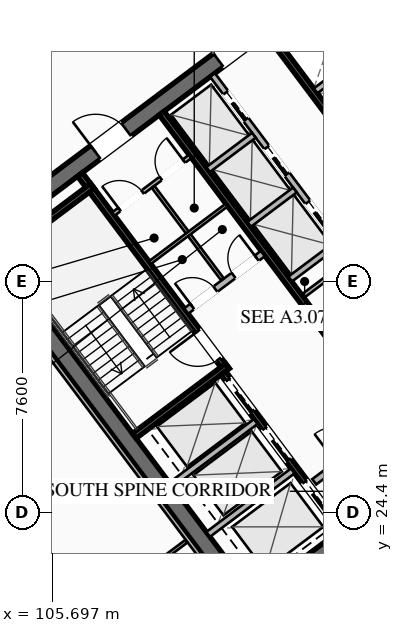
"""IFC4 building model, lengths in metres.
Left out: names, types, materials, properties, quantities, classifications, styles, units other than length and angle.
Written with IfcOpenShell. Run it as: python <this file> out.ifc"""

import sys

from ifc_helpers import new_model, si_unit, direction, frame, frame_2d, origin, place, context, subcontext, project, spatial, rectangle, extrude, element, fill, save


model = new_model("IFC4")
c1 = context("Model", 3, precision=1e-05, world=origin(), true_north=direction((0.0, 1.0)))
c2 = subcontext(c1, "Body", "Model", "MODEL_VIEW")
j1 = project(units=[si_unit("LENGTHUNIT", "METRE"), si_unit("PLANEANGLEUNIT", "RADIAN")], contexts=[c1])
p1 = place(None, origin())
s1 = spatial("IfcSite", under=j1, at=p1, CompositionType="ELEMENT")
p2 = place(p1, origin())
s2 = spatial("IfcBuilding", under=s1, at=p2, CompositionType="ELEMENT")
p3 = place(p2, frame((0.0, 0.0, 174.75)))
s3 = spatial("IfcBuildingStorey", under=s2, at=p3, CompositionType="ELEMENT", Elevation=174.75)
p4 = place(p3, frame((112.436, 21.077, 0.0), z_axis=(0.0, 0.0, 1.0), x_axis=(-0.600005007985, 0.799996243986, 0.0)))
e1 = element("IfcWall", 1, at=p4, inside=s3, PredefinedType="SHEAR", context=c2, shape_type="SweptSolid", body=[
    extrude(rectangle(XDim=15.6, YDim=0.55, at=frame_2d((7.8, 0.0))), origin(), (0.0, 0.0, 1.0), 3.55),
])
p5 = place(p3, frame((124.539, 30.498, 0.0), z_axis=(0.0, 0.0, 1.0), x_axis=(-0.799998054672, -0.600002593761, 0.0)))
e2 = element("IfcWall", 2, at=p5, inside=s3, PredefinedType="SHEAR", context=c2, shape_type="SweptSolid", body=[
    extrude(rectangle(XDim=15.06, YDim=0.55, at=frame_2d((7.53, 0.0))), origin(), (0.0, 0.0, 1.0), 3.55),
])
p6 = place(p5, frame((9.23, 0.0, 0.0)))
e3 = element("IfcOpeningElement", 3, at=p6, cuts=e2, PredefinedType="OPENING", context=c2, shape_type="SweptSolid", body=[
    extrude(rectangle(XDim=1.25, YDim=2.25, at=frame_2d((0.625, 1.125))), frame((0.0, 0.285, 0.0), z_axis=(0.0, -1.0, 0.0), x_axis=(1.0, 0.0, 0.0)), (0.0, 0.0, 1.0), 0.57),
])
p7 = place(p5, frame((4.18, 0.0, 0.0)))
e4 = element("IfcOpeningElement", 4, at=p7, cuts=e2, PredefinedType="OPENING", context=c2, shape_type="SweptSolid", body=[
    extrude(rectangle(XDim=1.25, YDim=2.25, at=frame_2d((0.625, 1.125))), frame((0.0, 0.285, 0.0), z_axis=(0.0, -1.0, 0.0), x_axis=(1.0, 0.0, 0.0)), (0.0, 0.0, 1.0), 0.57),
])
p8 = place(p3, frame((103.461, 33.502, 0.0), z_axis=(0.0, 0.0, 1.0), x_axis=(0.799998054672, 0.600002593761, 0.0)))
e5 = element("IfcWall", 5, at=p8, inside=s3, PredefinedType="SHEAR", context=c2, shape_type="SweptSolid", body=[
    extrude(rectangle(XDim=15.06, YDim=0.55, at=frame_2d((7.53, 0.0))), origin(), (0.0, 0.0, 1.0), 3.55),
])
p9 = place(p8, frame((4.58, 0.0, 0.0)))
e6 = element("IfcOpeningElement", 6, at=p9, cuts=e5, PredefinedType="OPENING", context=c2, shape_type="SweptSolid", body=[
    extrude(rectangle(XDim=1.25, YDim=2.25, at=frame_2d((0.625, 1.125))), frame((0.0, 0.285, 0.0), z_axis=(0.0, -1.0, 0.0), x_axis=(1.0, 0.0, 0.0)), (0.0, 0.0, 1.0), 0.57),
])
p10 = place(p8, frame((9.63, 0.0, 0.0)))
e7 = element("IfcOpeningElement", 7, at=p10, cuts=e5, PredefinedType="OPENING", context=c2, shape_type="SweptSolid", body=[
    extrude(rectangle(XDim=1.25, YDim=2.25, at=frame_2d((0.625, 1.125))), frame((0.0, 0.285, 0.0), z_axis=(0.0, -1.0, 0.0), x_axis=(1.0, 0.0, 0.0)), (0.0, 0.0, 1.0), 0.57),
])
p11 = place(p3, frame((111.44, 29.08, 0.0), z_axis=(0.0, 0.0, 1.0), x_axis=(-0.59999029481, 0.8000072788, 0.0)))
e8 = element("IfcWall", 8, at=p11, inside=s3, PredefinedType="SHEAR", context=c2, shape_type="SweptSolid", body=[
    extrude(rectangle(XDim=8.05, YDim=0.2, at=frame_2d((4.025, 0.0))), origin(), (0.0, 0.0, 1.0), 3.37),
])
p12 = place(p11, frame((0.45, 0.0, 0.0)))
e9 = element("IfcOpeningElement", 9, at=p12, cuts=e8, PredefinedType="OPENING", context=c2, shape_type="SweptSolid", body=[
    extrude(rectangle(XDim=1.15, YDim=2.2, at=frame_2d((0.575, 1.1))), frame((0.0, 0.11, 0.0), z_axis=(0.0, -1.0, 0.0), x_axis=(1.0, 0.0, 0.0)), (0.0, 0.0, 1.0), 0.22),
])
for number, where, z_axis, x_axis in (
    (10, (108.396, 26.922, 0.0), (0.0, 0.0, 1.0), (0.8, 0.6, 0.0)),
    (11, (103.956, 32.842, 0.0), (0.0, 0.0, 1.0), (0.8, 0.6, 0.0)),
):
    element("IfcWall", number, at=place(p3, frame(where, z_axis=z_axis, x_axis=x_axis)), inside=s3, PredefinedType="SHEAR", context=c2, shape_type="SweptSolid", body=[
        extrude(rectangle(XDim=3.83, YDim=0.2, at=frame_2d((1.915, 0.0))), origin(), (0.0, 0.0, 1.0), 3.37),
    ])
p13 = place(p3, frame((117.998, 25.936, 0.0), z_axis=(0.0, 0.0, 1.0), x_axis=(-0.600002693989, 0.799997979501, 0.0)))
e12 = element("IfcWall", 12, at=p13, inside=s3, PredefinedType="SHEAR", context=c2, shape_type="SweptSolid", body=[
    extrude(rectangle(XDim=14.5, YDim=0.2, at=frame_2d((7.25, 0.0))), origin(), (0.0, 0.0, 1.0), 3.37),
])
p14 = place(p3, frame((110.104, 31.028, 0.0), z_axis=(0.0, 0.0, 1.0), x_axis=(0.800018601094, 0.59997519774, 0.0)))
e13 = element("IfcWall", 13, at=p14, inside=s3, PredefinedType="SOLIDWALL", context=c2, shape_type="SweptSolid", body=[
    extrude(rectangle(XDim=3.15, YDim=0.22, at=frame_2d((1.575, 0.0))), origin(), (0.0, 0.0, 1.0), 2.723),
])
p15 = place(p14, frame((0.25, 0.0, 0.0)))
e14 = element("IfcOpeningElement", 14, at=p15, cuts=e13, PredefinedType="OPENING", context=c2, shape_type="SweptSolid", body=[
    extrude(rectangle(XDim=0.95, YDim=2.05, at=frame_2d((0.475, 1.025))), frame((0.0, 0.12, 0.0), z_axis=(0.0, -1.0, 0.0), x_axis=(1.0, 0.0, 0.0)), (0.0, 0.0, 1.0), 0.24),
])
p16 = place(p14, frame((1.95, 0.0, 0.0)))
e15 = element("IfcOpeningElement", 15, at=p16, cuts=e13, PredefinedType="OPENING", context=c2, shape_type="SweptSolid", body=[
    extrude(rectangle(XDim=0.95, YDim=2.05, at=frame_2d((0.475, 1.025))), frame((0.0, 0.12, 0.0), z_axis=(0.0, -1.0, 0.0), x_axis=(1.0, 0.0, 0.0)), (0.0, 0.0, 1.0), 0.24),
])
p17 = place(p3, frame((114.316, 25.412, 0.0), z_axis=(0.0, 0.0, 1.0), x_axis=(0.800018601094, 0.59997519774, 0.0)))
e16 = element("IfcWall", 16, at=p17, inside=s3, PredefinedType="SOLIDWALL", context=c2, shape_type="SweptSolid", body=[
    extrude(rectangle(XDim=3.15, YDim=0.22, at=frame_2d((1.575, 0.0))), origin(), (0.0, 0.0, 1.0), 2.723),
])
p18 = place(p17, frame((0.95, 0.0, 0.0)))
e17 = element("IfcOpeningElement", 17, at=p18, cuts=e16, PredefinedType="OPENING", context=c2, shape_type="SweptSolid", body=[
    extrude(rectangle(XDim=1.25, YDim=2.25, at=frame_2d((0.625, 1.125))), frame((0.0, 0.12, 0.0), z_axis=(0.0, -1.0, 0.0), x_axis=(1.0, 0.0, 0.0)), (0.0, 0.0, 1.0), 0.24),
])
p19 = place(p3, frame((115.19, 23.83, 0.0), z_axis=(0.0, 0.0, 1.0), x_axis=(-0.599993943644, 0.800004542231, 0.0)))
e18 = element("IfcWall", 18, at=p19, inside=s3, PredefinedType="SHEAR", context=c2, shape_type="SweptSolid", body=[
    extrude(rectangle(XDim=6.45, YDim=0.2, at=frame_2d((3.225, 0.0))), origin(), (0.0, 0.0, 1.0), 3.37),
])
p20 = place(p19, frame((4.875, 0.0, 0.0)))
e19 = element("IfcOpeningElement", 19, at=p20, cuts=e18, PredefinedType="OPENING", context=c2, shape_type="SweptSolid", body=[
    extrude(rectangle(XDim=1.3, YDim=2.25, at=frame_2d((0.65, 1.125))), frame((0.0, 0.11, 0.0), z_axis=(0.0, -1.0, 0.0), x_axis=(1.0, 0.0, 0.0)), (0.0, 0.0, 1.0), 0.22),
])
p21 = place(p19, frame((2.875, 0.0, 0.0)))
e20 = element("IfcOpeningElement", 20, at=p21, cuts=e18, PredefinedType="OPENING", context=c2, shape_type="SweptSolid", body=[
    extrude(rectangle(XDim=1.3, YDim=2.25, at=frame_2d((0.65, 1.125))), frame((0.0, 0.11, 0.0), z_axis=(0.0, -1.0, 0.0), x_axis=(1.0, 0.0, 0.0)), (0.0, 0.0, 1.0), 0.22),
])
p22 = place(p19, frame((0.675, 0.0, 0.0)))
e21 = element("IfcOpeningElement", 21, at=p22, cuts=e18, PredefinedType="OPENING", context=c2, shape_type="SweptSolid", body=[
    extrude(rectangle(XDim=1.3, YDim=2.25, at=frame_2d((0.65, 1.125))), frame((0.0, 0.11, 0.0), z_axis=(0.0, -1.0, 0.0), x_axis=(1.0, 0.0, 0.0)), (0.0, 0.0, 1.0), 0.22),
])
for number, where, z_axis, x_axis in (
    (22, (110.826, 23.682, 0.0), (0.0, 0.0, 1.0), (0.8, 0.6, 0.0)),
    (23, (109.608, 25.306, 0.0), (0.0, 0.0, 1.0), (0.8, 0.6, 0.0)),
):
    element("IfcWall", number, at=place(p3, frame(where, z_axis=z_axis, x_axis=x_axis)), inside=s3, PredefinedType="SOLIDWALL", context=c2, shape_type="SweptSolid", body=[
        extrude(rectangle(XDim=3.48, YDim=0.2, at=frame_2d((1.74, 0.0))), origin(), (0.0, 0.0, 1.0), 3.37),
    ])
p23 = place(p3, frame((112.81, 40.17, 0.0), z_axis=(0.0, 0.0, 1.0), x_axis=(0.599993943644, -0.800004542231, 0.0)))
e24 = element("IfcWall", 24, at=p23, inside=s3, PredefinedType="SHEAR", context=c2, shape_type="SweptSolid", body=[
    extrude(rectangle(XDim=6.45, YDim=0.2, at=frame_2d((3.225, 0.0))), origin(), (0.0, 0.0, 1.0), 3.37),
])
p24 = place(p3, frame((114.36, 38.27, 0.0), z_axis=(0.0, 0.0, 1.0), x_axis=(0.800008418847, 0.599988774707, 0.0)))
e25 = element("IfcWall", 25, at=p24, inside=s3, PredefinedType="SOLIDWALL", context=c2, shape_type="SweptSolid", body=[
    extrude(rectangle(XDim=3.48, YDim=0.2, at=frame_2d((1.74, 0.0))), origin(), (0.0, 0.0, 1.0), 3.37),
])
p25 = place(p3, frame((107.71, 34.22, 0.0), z_axis=(0.0, 0.0, 1.0), x_axis=(0.799981399002, 0.60002480053, 0.0)))
e26 = element("IfcWall", 26, at=p25, inside=s3, PredefinedType="PARTITIONING", context=c2, shape_type="SweptSolid", body=[
    extrude(rectangle(XDim=3.15, YDim=0.135, at=frame_2d((1.575, 0.0))), origin(), (0.0, 0.0, 1.0), 2.723),
])
p26 = place(p25, frame((0.25, 0.0, 0.0)))
e27 = element("IfcOpeningElement", 27, at=p26, cuts=e26, PredefinedType="OPENING", context=c2, shape_type="SweptSolid", body=[
    extrude(rectangle(XDim=0.95, YDim=2.05, at=frame_2d((0.475, 1.025))), frame((0.0, 0.077, 0.0), z_axis=(0.0, -1.0, 0.0), x_axis=(1.0, 0.0, 0.0)), (0.0, 0.0, 1.0), 0.155),
])
p27 = place(p25, frame((1.95, 0.0, 0.0)))
e28 = element("IfcOpeningElement", 28, at=p27, cuts=e26, PredefinedType="OPENING", context=c2, shape_type="SweptSolid", body=[
    extrude(rectangle(XDim=0.95, YDim=2.05, at=frame_2d((0.475, 1.025))), frame((0.0, 0.077, 0.0), z_axis=(0.0, -1.0, 0.0), x_axis=(1.0, 0.0, 0.0)), (0.0, 0.0, 1.0), 0.155),
])
p28 = place(p3, frame((111.296, 32.072, 0.0), z_axis=(0.0, 0.0, 1.0), x_axis=(-0.59995887973, 0.800030838552, 0.0)))
e29 = element("IfcWall", 29, at=p28, inside=s3, PredefinedType="PARTITIONING", context=c2, shape_type="SweptSolid", body=[
    extrude(rectangle(XDim=3.8, YDim=0.11, at=frame_2d((1.9, 0.0))), origin(), (0.0, 0.0, 1.0), 2.723),
])
p29 = place(p3, frame((108.91, 32.62, 0.0), z_axis=(0.0, 0.0, 1.0), x_axis=(0.800018601094, 0.59997519774, 0.0)))
e30 = element("IfcWall", 30, at=p29, inside=s3, PredefinedType="PARTITIONING", context=c2, shape_type="SweptSolid", body=[
    extrude(rectangle(XDim=3.15, YDim=0.11, at=frame_2d((1.575, 0.0))), origin(), (0.0, 0.0, 1.0), 2.723),
])
p30 = place(p3, frame((113.946, 31.522, 0.0), z_axis=(0.0, 0.0, 1.0), x_axis=(0.8, 0.6, 0.0)))
e31 = element("IfcWall", 31, at=p30, inside=s3, PredefinedType="PARTITIONING", context=c2, shape_type="SweptSolid", body=[
    extrude(rectangle(XDim=1.88, YDim=0.135, at=frame_2d((0.94, 0.0))), origin(), (0.0, 0.0, 1.0), 2.723),
])
p31 = place(p3, frame((115.11, 33.27, 0.0), z_axis=(0.0, 0.0, 1.0), x_axis=(-0.600011322243, 0.799991508192, 0.0)))
e32 = element("IfcWall", 32, at=p31, inside=s3, PredefinedType="SOLIDWALL", context=c2, shape_type="SweptSolid", body=[
    extrude(rectangle(XDim=6.9, YDim=0.2, at=frame_2d((3.45, 0.0))), origin(), (0.0, 0.0, 1.0), 3.37),
])
p32 = place(p31, frame((0.575, 0.0, 0.0)))
e33 = element("IfcOpeningElement", 33, at=p32, cuts=e32, PredefinedType="OPENING", context=c2, shape_type="SweptSolid", body=[
    extrude(rectangle(XDim=1.1, YDim=2.2, at=frame_2d((0.55, 1.1))), frame((0.0, 0.11, 0.0), z_axis=(0.0, -1.0, 0.0), x_axis=(1.0, 0.0, 0.0)), (0.0, 0.0, 1.0), 0.22),
])
p33 = place(p31, frame((2.825, 0.0, 0.0)))
e34 = element("IfcOpeningElement", 34, at=p33, cuts=e32, PredefinedType="OPENING", context=c2, shape_type="SweptSolid", body=[
    extrude(rectangle(XDim=1.1, YDim=2.2, at=frame_2d((0.55, 1.1))), frame((0.0, 0.11, 0.0), z_axis=(0.0, -1.0, 0.0), x_axis=(1.0, 0.0, 0.0)), (0.0, 0.0, 1.0), 0.22),
])
p34 = place(p31, frame((5.075, 0.0, 0.0)))
e35 = element("IfcOpeningElement", 35, at=p34, cuts=e32, PredefinedType="OPENING", context=c2, shape_type="SweptSolid", body=[
    extrude(rectangle(XDim=1.1, YDim=2.2, at=frame_2d((0.55, 1.1))), frame((0.0, 0.11, 0.0), z_axis=(0.0, -1.0, 0.0), x_axis=(1.0, 0.0, 0.0)), (0.0, 0.0, 1.0), 0.22),
])
p35 = place(p3, frame((113.526, 32.082, 0.0), z_axis=(0.0, 0.0, 1.0), x_axis=(0.800046745961, 0.599937666993, 0.0)))
e36 = element("IfcWall", 36, at=p35, inside=s3, PredefinedType="SOLIDWALL", context=c2, shape_type="SweptSolid", body=[
    extrude(rectangle(XDim=1.88, YDim=0.2, at=frame_2d((0.94, 0.0))), origin(), (0.0, 0.0, 1.0), 3.37),
])
p36 = place(p3, frame((112.176, 33.882, 0.0), z_axis=(0.0, 0.0, 1.0), x_axis=(0.8, 0.6, 0.0)))
e37 = element("IfcWall", 37, at=p36, inside=s3, PredefinedType="SOLIDWALL", context=c2, shape_type="SweptSolid", body=[
    extrude(rectangle(XDim=1.88, YDim=0.2, at=frame_2d((0.94, 0.0))), origin(), (0.0, 0.0, 1.0), 3.37),
])
p37 = place(p3, frame((110.826, 35.682, 0.0), z_axis=(0.0, 0.0, 1.0), x_axis=(0.799984418148, 0.600020775241, 0.0)))
e38 = element("IfcWall", 38, at=p37, inside=s3, PredefinedType="SOLIDWALL", context=c2, shape_type="SweptSolid", body=[
    extrude(rectangle(XDim=1.88, YDim=0.2, at=frame_2d((0.94, 0.0))), origin(), (0.0, 0.0, 1.0), 3.37),
])
p38 = place(p3, frame((95.548, 32.686, 0.0), z_axis=(0.0, 0.0, 1.0), x_axis=(0.8, 0.6, 0.0)))
e39 = element("IfcWall", 39, at=p38, inside=s3, PredefinedType="PARTITIONING", context=c2, shape_type="SweptSolid", body=[
    extrude(rectangle(XDim=28.7, YDim=0.135, at=frame_2d((14.35, 0.0))), origin(), (0.0, 0.0, 1.0), 2.723),
])
p39 = place(p38, frame((0.3, 0.0, 0.0)))
e40 = element("IfcOpeningElement", 40, at=p39, cuts=e39, PredefinedType="OPENING", context=c2, shape_type="SweptSolid", body=[
    extrude(rectangle(XDim=0.95, YDim=2.05, at=frame_2d((0.475, 1.025))), frame((0.0, 0.077, 0.0), z_axis=(0.0, -1.0, 0.0), x_axis=(1.0, 0.0, 0.0)), (0.0, 0.0, 1.0), 0.155),
])
p40 = place(p38, frame((27.45, 0.0, 0.0)))
e41 = element("IfcOpeningElement", 41, at=p40, cuts=e39, PredefinedType="OPENING", context=c2, shape_type="SweptSolid", body=[
    extrude(rectangle(XDim=0.95, YDim=2.05, at=frame_2d((0.475, 1.025))), frame((0.0, 0.077, 0.0), z_axis=(0.0, -1.0, 0.0), x_axis=(1.0, 0.0, 0.0)), (0.0, 0.0, 1.0), 0.155),
])
p41 = place(p3, frame((131.15, 33.05, 0.0), z_axis=(0.0, 0.0, 1.0), x_axis=(-0.8, -0.6, 0.0)))
e42 = element("IfcWall", 42, at=p41, inside=s3, PredefinedType="PARTITIONING", context=c2, shape_type="SweptSolid", body=[
    extrude(rectangle(XDim=28.7, YDim=0.135, at=frame_2d((14.35, 0.0))), origin(), (0.0, 0.0, 1.0), 2.723),
])
p42 = place(p41, frame((27.37, 0.0, 0.0)))
e43 = element("IfcOpeningElement", 43, at=p42, cuts=e42, PredefinedType="OPENING", context=c2, shape_type="SweptSolid", body=[
    extrude(rectangle(XDim=0.95, YDim=2.05, at=frame_2d((0.475, 1.025))), frame((0.0, 0.077, 0.0), z_axis=(0.0, -1.0, 0.0), x_axis=(1.0, 0.0, 0.0)), (0.0, 0.0, 1.0), 0.155),
])
p43 = place(p41, frame((17.851, 0.0, 0.0)))
e44 = element("IfcOpeningElement", 44, at=p43, cuts=e42, PredefinedType="OPENING", context=c2, shape_type="SweptSolid", body=[
    extrude(rectangle(XDim=0.95, YDim=2.05, at=frame_2d((0.475, 1.025))), frame((0.0, 0.077, 0.0), z_axis=(0.0, -1.0, 0.0), x_axis=(1.0, 0.0, 0.0)), (0.0, 0.0, 1.0), 0.155),
])
p44 = place(p41, frame((13.601, 0.0, 0.0)))
e45 = element("IfcOpeningElement", 45, at=p44, cuts=e42, PredefinedType="OPENING", context=c2, shape_type="SweptSolid", body=[
    extrude(rectangle(XDim=0.95, YDim=2.05, at=frame_2d((0.475, 1.025))), frame((0.0, 0.077, 0.0), z_axis=(0.0, -1.0, 0.0), x_axis=(1.0, 0.0, 0.0)), (0.0, 0.0, 1.0), 0.155),
])
p45 = place(p41, frame((9.62, 0.0, 0.0)))
e46 = element("IfcOpeningElement", 46, at=p45, cuts=e42, PredefinedType="OPENING", context=c2, shape_type="SweptSolid", body=[
    extrude(rectangle(XDim=0.95, YDim=2.05, at=frame_2d((0.475, 1.025))), frame((0.0, 0.077, 0.0), z_axis=(0.0, -1.0, 0.0), x_axis=(1.0, 0.0, 0.0)), (0.0, 0.0, 1.0), 0.155),
])
p46 = place(p41, frame((0.38, 0.0, 0.0)))
e47 = element("IfcOpeningElement", 47, at=p46, cuts=e42, PredefinedType="OPENING", context=c2, shape_type="SweptSolid", body=[
    extrude(rectangle(XDim=0.95, YDim=2.05, at=frame_2d((0.475, 1.025))), frame((0.0, 0.077, 0.0), z_axis=(0.0, -1.0, 0.0), x_axis=(1.0, 0.0, 0.0)), (0.0, 0.0, 1.0), 0.155),
])
p47 = place(p3, frame((112.104, 20.928, 0.0), z_axis=(0.0, 0.0, 1.0), x_axis=(-0.599994940075, 0.800003794918, 0.0)))
e48 = element("IfcWall", 48, at=p47, inside=s3, PredefinedType="PARTITIONING", context=c2, shape_type="SweptSolid", body=[
    extrude(rectangle(XDim=15.44, YDim=0.135, at=frame_2d((7.72, 0.0))), origin(), (0.0, 0.0, 1.0), 2.723),
])
p48 = place(p3, frame((103.396, 18.422, 0.0), z_axis=(0.0, 0.0, 1.0), x_axis=(0.8, 0.6, 0.0)))
e49 = element("IfcWall", 49, at=p48, inside=s3, PredefinedType="PARTITIONING", context=c2, shape_type="SweptSolid", body=[
    extrude(rectangle(XDim=8.39, YDim=0.11, at=frame_2d((4.195, 0.0))), origin(), (0.0, 0.0, 1.0), 2.723),
])
p49 = place(p9, origin())
e50 = element("IfcDoor", 50, at=p49, inside=s3, OperationType="SINGLE_SWING_LEFT", PredefinedType="DOOR", context=c2, shape_type="SweptSolid", body=[
    extrude(rectangle(XDim=1.25, YDim=2.25, at=frame_2d((0.625, 1.125))), frame((0.0, 0.025, 0.0), z_axis=(0.0, -1.0, 0.0), x_axis=(1.0, 0.0, 0.0)), (0.0, 0.0, 1.0), 0.05),
])
fill(e6, e50)
p50 = place(p10, origin())
e51 = element("IfcDoor", 51, at=p50, inside=s3, OperationType="SINGLE_SWING_RIGHT", PredefinedType="DOOR", context=c2, shape_type="SweptSolid", body=[
    extrude(rectangle(XDim=1.25, YDim=2.25, at=frame_2d((0.625, 1.125))), frame((0.0, 0.025, 0.0), z_axis=(0.0, -1.0, 0.0), x_axis=(1.0, 0.0, 0.0)), (0.0, 0.0, 1.0), 0.05),
])
fill(e7, e51)
p51 = place(p12, origin())
e52 = element("IfcDoor", 52, at=p51, inside=s3, OperationType="SINGLE_SWING_RIGHT", PredefinedType="DOOR", context=c2, shape_type="SweptSolid", body=[
    extrude(rectangle(XDim=1.15, YDim=2.2, at=frame_2d((0.575, 1.1))), frame((0.0, 0.025, 0.0), z_axis=(0.0, -1.0, 0.0), x_axis=(1.0, 0.0, 0.0)), (0.0, 0.0, 1.0), 0.05),
])
fill(e9, e52)
p52 = place(p26, origin())
e53 = element("IfcDoor", 53, at=p52, inside=s3, OperationType="SINGLE_SWING_LEFT", PredefinedType="DOOR", context=c2, shape_type="SweptSolid", body=[
    extrude(rectangle(XDim=0.95, YDim=2.05, at=frame_2d((0.475, 1.025))), frame((0.0, 0.025, 0.0), z_axis=(0.0, -1.0, 0.0), x_axis=(1.0, 0.0, 0.0)), (0.0, 0.0, 1.0), 0.05),
])
fill(e27, e53)
p53 = place(p27, origin())
e54 = element("IfcDoor", 54, at=p53, inside=s3, OperationType="SINGLE_SWING_RIGHT", PredefinedType="DOOR", context=c2, shape_type="SweptSolid", body=[
    extrude(rectangle(XDim=0.95, YDim=2.05, at=frame_2d((0.475, 1.025))), frame((0.0, 0.025, 0.0), z_axis=(0.0, -1.0, 0.0), x_axis=(1.0, 0.0, 0.0)), (0.0, 0.0, 1.0), 0.05),
])
fill(e28, e54)
p54 = place(p15, origin())
e55 = element("IfcDoor", 55, at=p54, inside=s3, OperationType="SINGLE_SWING_LEFT", PredefinedType="DOOR", context=c2, shape_type="SweptSolid", body=[
    extrude(rectangle(XDim=0.95, YDim=2.05, at=frame_2d((0.475, 1.025))), frame((0.0, 0.025, 0.0), z_axis=(0.0, -1.0, 0.0), x_axis=(1.0, 0.0, 0.0)), (0.0, 0.0, 1.0), 0.05),
])
fill(e14, e55)
p55 = place(p16, origin())
e56 = element("IfcDoor", 56, at=p55, inside=s3, OperationType="SINGLE_SWING_RIGHT", PredefinedType="DOOR", context=c2, shape_type="SweptSolid", body=[
    extrude(rectangle(XDim=0.95, YDim=2.05, at=frame_2d((0.475, 1.025))), frame((0.0, 0.025, 0.0), z_axis=(0.0, -1.0, 0.0), x_axis=(1.0, 0.0, 0.0)), (0.0, 0.0, 1.0), 0.05),
])
fill(e15, e56)
p56 = place(p20, origin())
e57 = element("IfcDoor", 57, at=p56, inside=s3, OperationType="SLIDING_TO_LEFT", PredefinedType="DOOR", context=c2, shape_type="SweptSolid", body=[
    extrude(rectangle(XDim=1.3, YDim=2.25, at=frame_2d((0.65, 1.125))), frame((0.0, 0.025, 0.0), z_axis=(0.0, -1.0, 0.0), x_axis=(1.0, 0.0, 0.0)), (0.0, 0.0, 1.0), 0.05),
])
fill(e19, e57)
p57 = place(p21, origin())
e58 = element("IfcDoor", 58, at=p57, inside=s3, OperationType="SLIDING_TO_LEFT", PredefinedType="DOOR", context=c2, shape_type="SweptSolid", body=[
    extrude(rectangle(XDim=1.3, YDim=2.25, at=frame_2d((0.65, 1.125))), frame((0.0, 0.025, 0.0), z_axis=(0.0, -1.0, 0.0), x_axis=(1.0, 0.0, 0.0)), (0.0, 0.0, 1.0), 0.05),
])
fill(e20, e58)
p58 = place(p22, origin())
e59 = element("IfcDoor", 59, at=p58, inside=s3, OperationType="SLIDING_TO_LEFT", PredefinedType="DOOR", context=c2, shape_type="SweptSolid", body=[
    extrude(rectangle(XDim=1.3, YDim=2.25, at=frame_2d((0.65, 1.125))), frame((0.0, 0.025, 0.0), z_axis=(0.0, -1.0, 0.0), x_axis=(1.0, 0.0, 0.0)), (0.0, 0.0, 1.0), 0.05),
])
fill(e21, e59)
p59 = place(p32, origin())
e60 = element("IfcDoor", 60, at=p59, inside=s3, OperationType="SLIDING_TO_LEFT", PredefinedType="DOOR", context=c2, shape_type="SweptSolid", body=[
    extrude(rectangle(XDim=1.1, YDim=2.2, at=frame_2d((0.55, 1.1))), frame((0.0, 0.025, 0.0), z_axis=(0.0, -1.0, 0.0), x_axis=(1.0, 0.0, 0.0)), (0.0, 0.0, 1.0), 0.05),
])
fill(e33, e60)
p60 = place(p33, origin())
e61 = element("IfcDoor", 61, at=p60, inside=s3, OperationType="SLIDING_TO_LEFT", PredefinedType="DOOR", context=c2, shape_type="SweptSolid", body=[
    extrude(rectangle(XDim=1.1, YDim=2.2, at=frame_2d((0.55, 1.1))), frame((0.0, 0.025, 0.0), z_axis=(0.0, -1.0, 0.0), x_axis=(1.0, 0.0, 0.0)), (0.0, 0.0, 1.0), 0.05),
])
fill(e34, e61)
p61 = place(p34, origin())
e62 = element("IfcDoor", 62, at=p61, inside=s3, OperationType="SLIDING_TO_LEFT", PredefinedType="DOOR", context=c2, shape_type="SweptSolid", body=[
    extrude(rectangle(XDim=1.1, YDim=2.2, at=frame_2d((0.55, 1.1))), frame((0.0, 0.025, 0.0), z_axis=(0.0, -1.0, 0.0), x_axis=(1.0, 0.0, 0.0)), (0.0, 0.0, 1.0), 0.05),
])
fill(e35, e62)
save(model, sys.argv[1])
